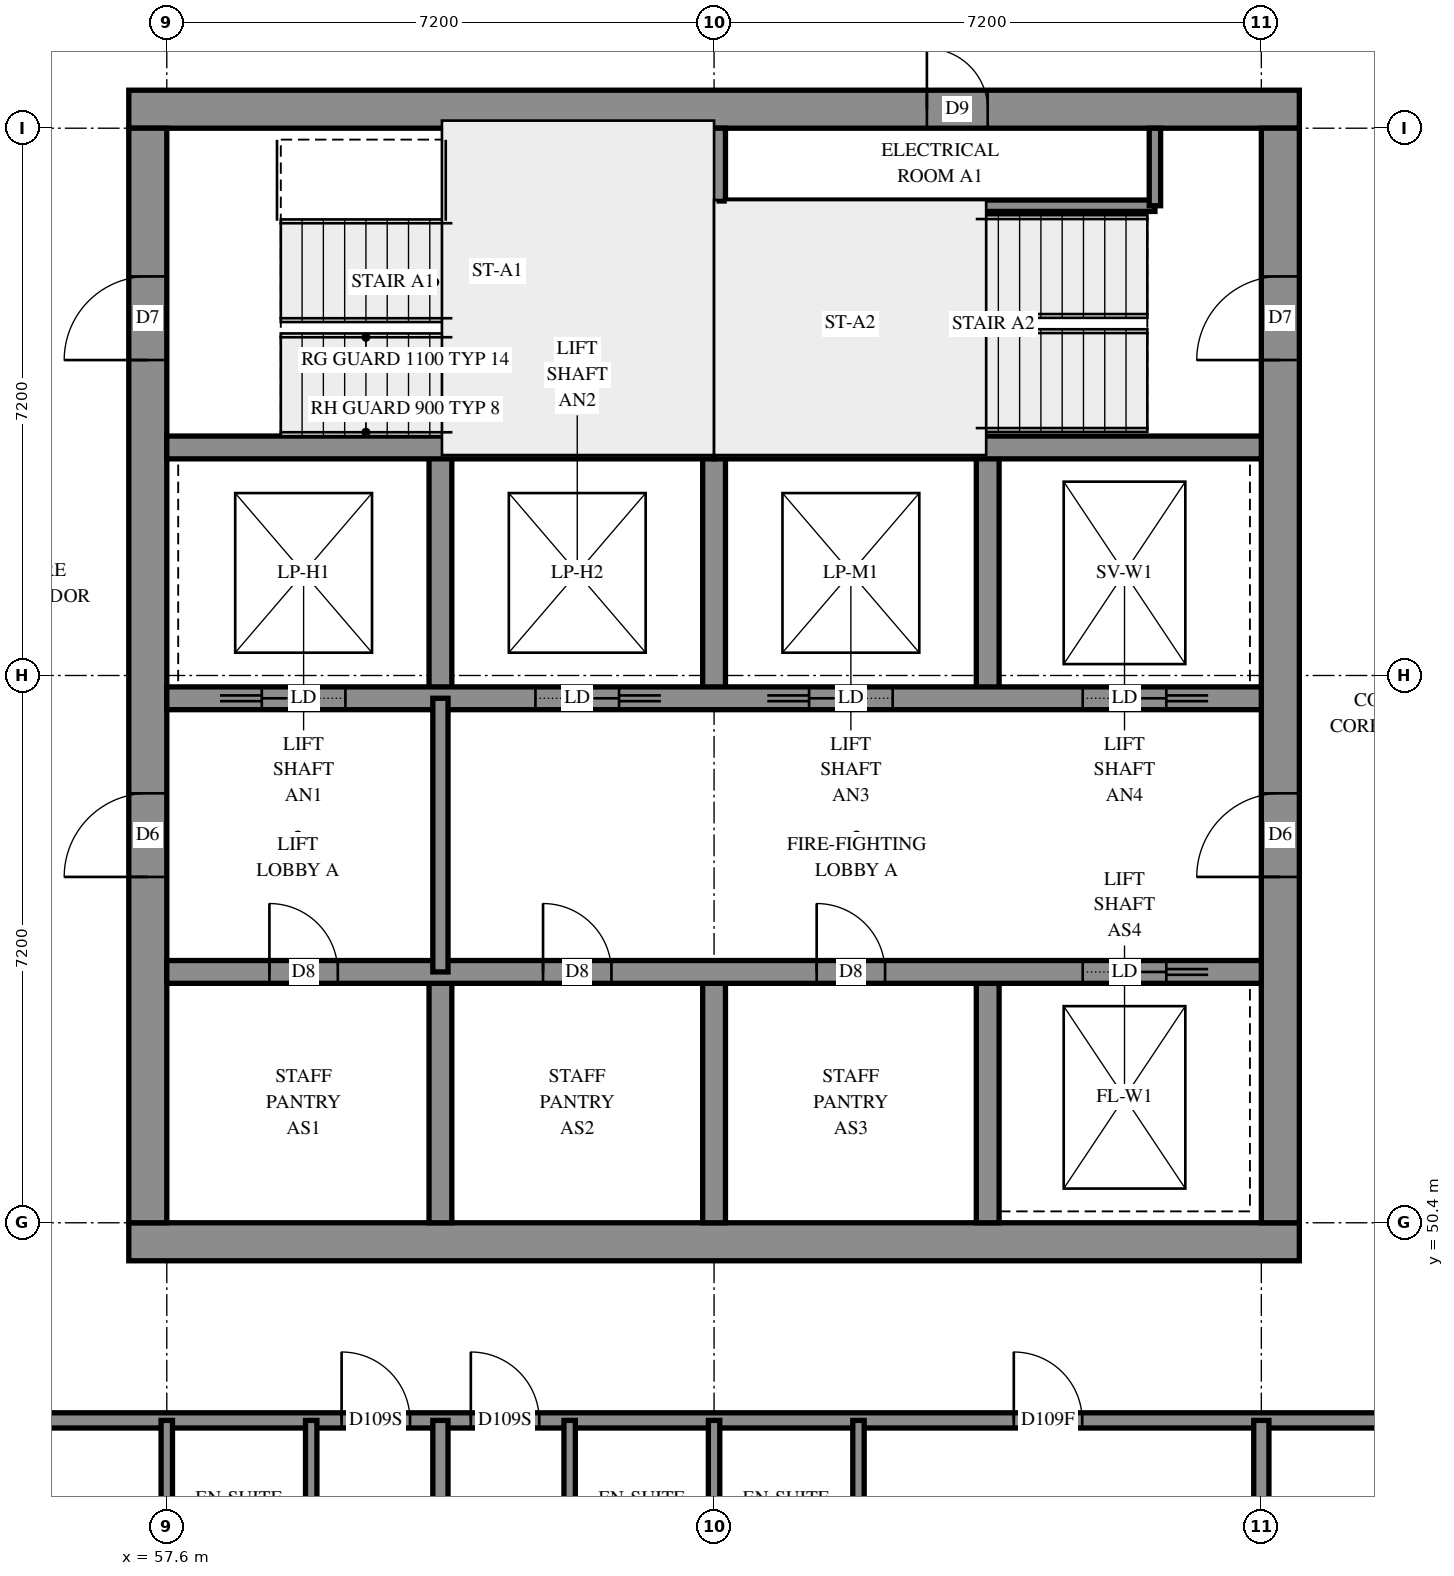
"""IFC4 building model, lengths in metres.
Left out: names, types, materials, properties, quantities, classifications, styles, units other than length and angle.
Written with IfcOpenShell. Run it as: python <this file> out.ifc"""

import sys

from ifc_helpers import new_model, si_unit, direction, frame, frame_2d, origin, place, context, subcontext, project, spatial, rectangle, extrude, element, fill, save


model = new_model("IFC4")
c1 = context("Model", 3, precision=1e-05, world=origin(), true_north=direction((0.0, 1.0)))
c2 = subcontext(c1, "Body", "Model", "MODEL_VIEW")
j1 = project(units=[si_unit("LENGTHUNIT", "METRE"), si_unit("PLANEANGLEUNIT", "RADIAN")], contexts=[c1])
p1 = place(None, origin())
s1 = spatial("IfcSite", under=j1, at=p1, CompositionType="ELEMENT")
p2 = place(p1, origin())
s2 = spatial("IfcBuilding", under=s1, at=p2, CompositionType="ELEMENT")
p3 = place(p2, frame((0.0, 0.0, 203.2)))
s3 = spatial("IfcBuildingStorey", under=s2, at=p3, CompositionType="ELEMENT", Elevation=203.2)
p4 = place(p3, frame((57.1, 50.15, -0.3), z_axis=(0.0, 0.0, 1.0), x_axis=(1.0, 0.0, 0.0)))
e1 = element("IfcWall", 1, at=p4, inside=s3, PredefinedType="SHEAR", context=c2, shape_type="SweptSolid", body=[
    extrude(rectangle(XDim=15.4, YDim=0.5, at=frame_2d((7.7, 0.0))), origin(), (0.0, 0.0, 1.0), 2.7),
])
p5 = place(p3, frame((57.1, 65.05, -0.3), z_axis=(0.0, 0.0, 1.0), x_axis=(1.0, 0.0, 0.0)))
e2 = element("IfcWall", 2, at=p5, inside=s3, PredefinedType="SHEAR", context=c2, shape_type="SweptSolid", body=[
    extrude(rectangle(XDim=15.4, YDim=0.5, at=frame_2d((7.7, 0.0))), origin(), (0.0, 0.0, 1.0), 2.7),
])
p6 = place(p5, frame((10.5, 0.0, 0.3)))
e3 = element("IfcOpeningElement", 3, at=p6, cuts=e2, PredefinedType="OPENING", context=c2, shape_type="SweptSolid", body=[
    extrude(rectangle(XDim=0.8, YDim=2.1, at=frame_2d((0.4, 1.05))), frame((0.0, 0.26, 0.0), z_axis=(0.0, -1.0, 0.0), x_axis=(1.0, 0.0, 0.0)), (0.0, 0.0, 1.0), 0.52),
])
p7 = place(p3, frame((57.35, 50.4, -0.3), z_axis=(0.0, 0.0, 1.0), x_axis=(0.0, 1.0, 0.0)))
e4 = element("IfcWall", 4, at=p7, inside=s3, PredefinedType="SHEAR", context=c2, shape_type="SweptSolid", body=[
    extrude(rectangle(XDim=14.4, YDim=0.5, at=frame_2d((7.2, 0.0))), origin(), (0.0, 0.0, 1.0), 2.7),
])
p8 = place(p7, frame((4.55, 0.0, 0.3)))
e5 = element("IfcOpeningElement", 5, at=p8, cuts=e4, PredefinedType="OPENING", context=c2, shape_type="SweptSolid", body=[
    extrude(rectangle(XDim=1.1, YDim=2.1, at=frame_2d((0.55, 1.05))), frame((0.0, 0.26, 0.0), z_axis=(0.0, -1.0, 0.0), x_axis=(1.0, 0.0, 0.0)), (0.0, 0.0, 1.0), 0.52),
])
p9 = place(p7, frame((11.35, 0.0, 0.3)))
e6 = element("IfcOpeningElement", 6, at=p9, cuts=e4, PredefinedType="OPENING", context=c2, shape_type="SweptSolid", body=[
    extrude(rectangle(XDim=1.1, YDim=2.1, at=frame_2d((0.55, 1.05))), frame((0.0, 0.26, 0.0), z_axis=(0.0, -1.0, 0.0), x_axis=(1.0, 0.0, 0.0)), (0.0, 0.0, 1.0), 0.52),
])
p10 = place(p3, frame((72.25, 50.4, -0.3), z_axis=(0.0, 0.0, 1.0), x_axis=(0.0, 1.0, 0.0)))
e7 = element("IfcWall", 7, at=p10, inside=s3, PredefinedType="SHEAR", context=c2, shape_type="SweptSolid", body=[
    extrude(rectangle(XDim=14.4, YDim=0.5, at=frame_2d((7.2, 0.0))), origin(), (0.0, 0.0, 1.0), 2.7),
])
p11 = place(p10, frame((4.55, 0.0, 0.3)))
e8 = element("IfcOpeningElement", 8, at=p11, cuts=e7, PredefinedType="OPENING", context=c2, shape_type="SweptSolid", body=[
    extrude(rectangle(XDim=1.1, YDim=2.1, at=frame_2d((0.55, 1.05))), frame((0.0, 0.26, 0.0), z_axis=(0.0, -1.0, 0.0), x_axis=(1.0, 0.0, 0.0)), (0.0, 0.0, 1.0), 0.52),
])
p12 = place(p10, frame((11.35, 0.0, 0.3)))
e9 = element("IfcOpeningElement", 9, at=p12, cuts=e7, PredefinedType="OPENING", context=c2, shape_type="SweptSolid", body=[
    extrude(rectangle(XDim=1.1, YDim=2.1, at=frame_2d((0.55, 1.05))), frame((0.0, 0.26, 0.0), z_axis=(0.0, -1.0, 0.0), x_axis=(1.0, 0.0, 0.0)), (0.0, 0.0, 1.0), 0.52),
])
for number, where, z_axis, x_axis in (
    (10, (61.2, 50.4, 0.0), (0.0, 0.0, 1.0), (0.0, 1.0, 0.0)),
    (11, (61.2, 57.3, 0.0), (0.0, 0.0, 1.0), (0.0, 1.0, 0.0)),
    (12, (64.8, 50.4, 0.0), (0.0, 0.0, 1.0), (0.0, 1.0, 0.0)),
    (13, (64.8, 57.3, 0.0), (0.0, 0.0, 1.0), (0.0, 1.0, 0.0)),
    (14, (68.4, 50.4, 0.0), (0.0, 0.0, 1.0), (0.0, 1.0, 0.0)),
    (15, (68.4, 57.3, 0.0), (0.0, 0.0, 1.0), (0.0, 1.0, 0.0)),
):
    element("IfcWall", number, at=place(p3, frame(where, z_axis=z_axis, x_axis=x_axis)), inside=s3, PredefinedType="SOLIDWALL", context=c2, shape_type="SweptSolid", body=[
        extrude(rectangle(XDim=3.3, YDim=0.3, at=frame_2d((1.65, 0.0))), origin(), (0.0, 0.0, 1.0), 3.1),
    ])
p13 = place(p3, frame((57.6, 53.7, 0.0), z_axis=(0.0, 0.0, 1.0), x_axis=(1.0, 0.0, 0.0)))
e16 = element("IfcWall", 16, at=p13, inside=s3, PredefinedType="SOLIDWALL", context=c2, shape_type="SweptSolid", body=[
    extrude(rectangle(XDim=14.4, YDim=0.3, at=frame_2d((7.2, 0.0))), origin(), (0.0, 0.0, 1.0), 3.1),
])
p14 = place(p13, frame((1.35, 0.0, 0.0)))
e17 = element("IfcOpeningElement", 17, at=p14, cuts=e16, PredefinedType="OPENING", context=c2, shape_type="SweptSolid", body=[
    extrude(rectangle(XDim=0.9, YDim=2.1, at=frame_2d((0.45, 1.05))), frame((0.0, 0.16, 0.0), z_axis=(0.0, -1.0, 0.0), x_axis=(1.0, 0.0, 0.0)), (0.0, 0.0, 1.0), 0.32),
])
p15 = place(p13, frame((4.95, 0.0, 0.0)))
e18 = element("IfcOpeningElement", 18, at=p15, cuts=e16, PredefinedType="OPENING", context=c2, shape_type="SweptSolid", body=[
    extrude(rectangle(XDim=0.9, YDim=2.1, at=frame_2d((0.45, 1.05))), frame((0.0, 0.16, 0.0), z_axis=(0.0, -1.0, 0.0), x_axis=(1.0, 0.0, 0.0)), (0.0, 0.0, 1.0), 0.32),
])
p16 = place(p13, frame((8.55, 0.0, 0.0)))
e19 = element("IfcOpeningElement", 19, at=p16, cuts=e16, PredefinedType="OPENING", context=c2, shape_type="SweptSolid", body=[
    extrude(rectangle(XDim=0.9, YDim=2.1, at=frame_2d((0.45, 1.05))), frame((0.0, 0.16, 0.0), z_axis=(0.0, -1.0, 0.0), x_axis=(1.0, 0.0, 0.0)), (0.0, 0.0, 1.0), 0.32),
])
p17 = place(p13, frame((12.05, 0.0, 0.0)))
e20 = element("IfcOpeningElement", 20, at=p17, cuts=e16, PredefinedType="OPENING", context=c2, shape_type="SweptSolid", body=[
    extrude(rectangle(XDim=1.1, YDim=2.1, at=frame_2d((0.55, 1.05))), frame((0.0, 0.16, 0.0), z_axis=(0.0, -1.0, 0.0), x_axis=(1.0, 0.0, 0.0)), (0.0, 0.0, 1.0), 0.32),
])
p18 = place(p3, frame((57.6, 57.3, 0.0), z_axis=(0.0, 0.0, 1.0), x_axis=(1.0, 0.0, 0.0)))
e21 = element("IfcWall", 21, at=p18, inside=s3, PredefinedType="SOLIDWALL", context=c2, shape_type="SweptSolid", body=[
    extrude(rectangle(XDim=14.4, YDim=0.3, at=frame_2d((7.2, 0.0))), origin(), (0.0, 0.0, 1.0), 3.1),
])
p19 = place(p18, frame((1.25, 0.0, 0.0)))
e22 = element("IfcOpeningElement", 22, at=p19, cuts=e21, PredefinedType="OPENING", context=c2, shape_type="SweptSolid", body=[
    extrude(rectangle(XDim=1.1, YDim=2.1, at=frame_2d((0.55, 1.05))), frame((0.0, 0.16, 0.0), z_axis=(0.0, -1.0, 0.0), x_axis=(1.0, 0.0, 0.0)), (0.0, 0.0, 1.0), 0.32),
])
p20 = place(p18, frame((4.85, 0.0, 0.0)))
e23 = element("IfcOpeningElement", 23, at=p20, cuts=e21, PredefinedType="OPENING", context=c2, shape_type="SweptSolid", body=[
    extrude(rectangle(XDim=1.1, YDim=2.1, at=frame_2d((0.55, 1.05))), frame((0.0, 0.16, 0.0), z_axis=(0.0, -1.0, 0.0), x_axis=(1.0, 0.0, 0.0)), (0.0, 0.0, 1.0), 0.32),
])
p21 = place(p18, frame((8.45, 0.0, 0.0)))
e24 = element("IfcOpeningElement", 24, at=p21, cuts=e21, PredefinedType="OPENING", context=c2, shape_type="SweptSolid", body=[
    extrude(rectangle(XDim=1.1, YDim=2.1, at=frame_2d((0.55, 1.05))), frame((0.0, 0.16, 0.0), z_axis=(0.0, -1.0, 0.0), x_axis=(1.0, 0.0, 0.0)), (0.0, 0.0, 1.0), 0.32),
])
p22 = place(p18, frame((12.05, 0.0, 0.0)))
e25 = element("IfcOpeningElement", 25, at=p22, cuts=e21, PredefinedType="OPENING", context=c2, shape_type="SweptSolid", body=[
    extrude(rectangle(XDim=1.1, YDim=2.1, at=frame_2d((0.55, 1.05))), frame((0.0, 0.16, 0.0), z_axis=(0.0, -1.0, 0.0), x_axis=(1.0, 0.0, 0.0)), (0.0, 0.0, 1.0), 0.32),
])
for number, where, z_axis, x_axis in (
    (26, (57.6, 60.6, 0.0), (0.0, 0.0, 1.0), (1.0, 0.0, 0.0)),
    (27, (64.8, 60.6, 0.0), (0.0, 0.0, 1.0), (1.0, 0.0, 0.0)),
):
    element("IfcWall", number, at=place(p3, frame(where, z_axis=z_axis, x_axis=x_axis)), inside=s3, PredefinedType="SOLIDWALL", context=c2, shape_type="SweptSolid", body=[
        extrude(rectangle(XDim=7.2, YDim=0.3, at=frame_2d((3.6, 0.0))), origin(), (0.0, 0.0, 1.0), 3.1),
    ])
p23 = place(p3, frame((64.8, 60.6, 0.0), z_axis=(0.0, 0.0, 1.0), x_axis=(0.0, 1.0, 0.0)))
e28 = element("IfcWall", 28, at=p23, inside=s3, PredefinedType="SOLIDWALL", context=c2, shape_type="SweptSolid", body=[
    extrude(rectangle(XDim=4.2, YDim=0.3, at=frame_2d((2.1, 0.0))), origin(), (0.0, 0.0, 1.0), 3.1),
])
p24 = place(p3, frame((64.95, 63.78, 0.0), z_axis=(0.0, 0.0, 1.0), x_axis=(1.0, 0.0, 0.0)))
e29 = element("IfcWall", 29, at=p24, inside=s3, PredefinedType="PARTITIONING", context=c2, shape_type="SweptSolid", body=[
    extrude(rectangle(XDim=5.65, YDim=0.15, at=frame_2d((2.825, 0.0))), origin(), (0.0, 0.0, 1.0), 3.1),
])
p25 = place(p3, frame((70.6, 63.78, 0.0), z_axis=(0.0, 0.0, 1.0), x_axis=(0.0, 1.0, 0.0)))
e30 = element("IfcWall", 30, at=p25, inside=s3, PredefinedType="PARTITIONING", context=c2, shape_type="SweptSolid", body=[
    extrude(rectangle(XDim=1.02, YDim=0.15, at=frame_2d((0.51, 0.0))), origin(), (0.0, 0.0, 1.0), 3.1),
])
p26 = place(p3, frame((61.2, 53.7, 0.0), z_axis=(0.0, 0.0, 1.0), x_axis=(0.0, 1.0, 0.0)))
e31 = element("IfcWall", 31, at=p26, inside=s3, PredefinedType="PARTITIONING", context=c2, shape_type="SweptSolid", body=[
    extrude(rectangle(XDim=3.6, YDim=0.2, at=frame_2d((1.8, 0.0))), origin(), (0.0, 0.0, 1.0), 3.1),
])
p27 = place(p3, frame((55.0, 47.8, 0.0), z_axis=(0.0, 0.0, 1.0), x_axis=(1.0, 0.0, 0.0)))
e32 = element("IfcWall", 32, at=p27, inside=s3, PredefinedType="PARTITIONING", context=c2, shape_type="SweptSolid", body=[
    extrude(rectangle(XDim=19.266, YDim=0.2, at=frame_2d((9.633, 0.0))), origin(), (0.0, 0.0, 1.0), 3.1),
])
p28 = place(p27, frame((4.9, 0.0, 0.0)))
e33 = element("IfcOpeningElement", 33, at=p28, cuts=e32, PredefinedType="OPENING", context=c2, shape_type="SweptSolid", body=[
    extrude(rectangle(XDim=0.9, YDim=2.1, at=frame_2d((0.45, 1.05))), frame((0.0, 0.11, 0.0), z_axis=(0.0, -1.0, 0.0), x_axis=(1.0, 0.0, 0.0)), (0.0, 0.0, 1.0), 0.22),
])
p29 = place(p27, frame((6.6, 0.0, 0.0)))
e34 = element("IfcOpeningElement", 34, at=p29, cuts=e32, PredefinedType="OPENING", context=c2, shape_type="SweptSolid", body=[
    extrude(rectangle(XDim=0.9, YDim=2.1, at=frame_2d((0.45, 1.05))), frame((0.0, 0.11, 0.0), z_axis=(0.0, -1.0, 0.0), x_axis=(1.0, 0.0, 0.0)), (0.0, 0.0, 1.0), 0.22),
])
p30 = place(p27, frame((13.743, 0.0, 0.0)))
e35 = element("IfcOpeningElement", 35, at=p30, cuts=e32, PredefinedType="OPENING", context=c2, shape_type="SweptSolid", body=[
    extrude(rectangle(XDim=0.9, YDim=2.1, at=frame_2d((0.45, 1.05))), frame((0.0, 0.11, 0.0), z_axis=(0.0, -1.0, 0.0), x_axis=(1.0, 0.0, 0.0)), (0.0, 0.0, 1.0), 0.22),
])
p31 = place(p3, frame((61.2, 42.362, 0.0), z_axis=(0.0, 0.0, 1.0), x_axis=(0.0, 1.0, 0.0)))
e36 = element("IfcWall", 36, at=p31, inside=s3, PredefinedType="PARTITIONING", context=c2, shape_type="SweptSolid", body=[
    extrude(rectangle(XDim=5.438, YDim=0.2, at=frame_2d((2.719, 0.0))), origin(), (0.0, 0.0, 1.0), 3.1),
])
p32 = place(p3, frame((72.0, 43.6, 0.0), z_axis=(0.0, 0.0, 1.0), x_axis=(0.0, 1.0, 0.0)))
e37 = element("IfcWall", 37, at=p32, inside=s3, PredefinedType="PARTITIONING", context=c2, shape_type="SweptSolid", body=[
    extrude(rectangle(XDim=4.2, YDim=0.2, at=frame_2d((2.1, 0.0))), origin(), (0.0, 0.0, 1.0), 3.1),
])
for number, where, z_axis, x_axis in (
    (38, (59.5, 45.4, 0.0), (0.0, 0.0, 1.0), (0.0, 1.0, 0.0)),
    (39, (57.6, 45.4, 0.0), (0.0, 0.0, 1.0), (0.0, 1.0, 0.0)),
    (40, (62.9, 45.4, 0.0), (0.0, 0.0, 1.0), (0.0, 1.0, 0.0)),
    (41, (66.7, 45.4, 0.0), (0.0, 0.0, 1.0), (0.0, 1.0, 0.0)),
    (42, (64.8, 45.4, 0.0), (0.0, 0.0, 1.0), (0.0, 1.0, 0.0)),
):
    element("IfcWall", number, at=place(p3, frame(where, z_axis=z_axis, x_axis=x_axis)), inside=s3, PredefinedType="PARTITIONING", context=c2, shape_type="SweptSolid", body=[
        extrude(rectangle(XDim=2.4, YDim=0.15, at=frame_2d((1.2, 0.0))), origin(), (0.0, 0.0, 1.0), 3.1),
    ])
p33 = place(p6, origin())
e43 = element("IfcDoor", 43, at=p33, inside=s3, OperationType="SINGLE_SWING_RIGHT", PredefinedType="DOOR", context=c2, shape_type="SweptSolid", body=[
    extrude(rectangle(XDim=0.8, YDim=2.1, at=frame_2d((0.4, 1.05))), frame((0.0, 0.025, 0.0), z_axis=(0.0, -1.0, 0.0), x_axis=(1.0, 0.0, 0.0)), (0.0, 0.0, 1.0), 0.05),
])
fill(e3, e43)
p34 = place(p8, origin())
e44 = element("IfcDoor", 44, at=p34, inside=s3, OperationType="DOUBLE_DOOR_SINGLE_SWING", PredefinedType="DOOR", context=c2, shape_type="SweptSolid", body=[
    extrude(rectangle(XDim=1.1, YDim=2.1, at=frame_2d((0.55, 1.05))), frame((0.0, 0.025, 0.0), z_axis=(0.0, -1.0, 0.0), x_axis=(1.0, 0.0, 0.0)), (0.0, 0.0, 1.0), 0.05),
])
fill(e5, e44)
p35 = place(p11, origin())
e45 = element("IfcDoor", 45, at=p35, inside=s3, OperationType="DOUBLE_DOOR_SINGLE_SWING", PredefinedType="DOOR", context=c2, shape_type="SweptSolid", body=[
    extrude(rectangle(XDim=1.1, YDim=2.1, at=frame_2d((0.55, 1.05))), frame((0.0, 0.025, 0.0), z_axis=(0.0, -1.0, 0.0), x_axis=(1.0, 0.0, 0.0)), (0.0, 0.0, 1.0), 0.05),
])
fill(e8, e45)
p36 = place(p9, origin())
e46 = element("IfcDoor", 46, at=p36, inside=s3, OperationType="SINGLE_SWING_LEFT", PredefinedType="DOOR", context=c2, shape_type="SweptSolid", body=[
    extrude(rectangle(XDim=1.1, YDim=2.1, at=frame_2d((0.55, 1.05))), frame((0.0, 0.025, 0.0), z_axis=(0.0, -1.0, 0.0), x_axis=(1.0, 0.0, 0.0)), (0.0, 0.0, 1.0), 0.05),
])
fill(e6, e46)
p37 = place(p12, origin())
e47 = element("IfcDoor", 47, at=p37, inside=s3, OperationType="SINGLE_SWING_RIGHT", PredefinedType="DOOR", context=c2, shape_type="SweptSolid", body=[
    extrude(rectangle(XDim=1.1, YDim=2.1, at=frame_2d((0.55, 1.05))), frame((0.0, 0.025, 0.0), z_axis=(0.0, -1.0, 0.0), x_axis=(1.0, 0.0, 0.0)), (0.0, 0.0, 1.0), 0.05),
])
fill(e9, e47)
p38 = place(p14, origin())
e48 = element("IfcDoor", 48, at=p38, inside=s3, OperationType="SINGLE_SWING_LEFT", PredefinedType="DOOR", context=c2, shape_type="SweptSolid", body=[
    extrude(rectangle(XDim=0.9, YDim=2.1, at=frame_2d((0.45, 1.05))), frame((0.0, 0.025, 0.0), z_axis=(0.0, -1.0, 0.0), x_axis=(1.0, 0.0, 0.0)), (0.0, 0.0, 1.0), 0.05),
])
fill(e17, e48)
p39 = place(p15, origin())
e49 = element("IfcDoor", 49, at=p39, inside=s3, OperationType="SINGLE_SWING_LEFT", PredefinedType="DOOR", context=c2, shape_type="SweptSolid", body=[
    extrude(rectangle(XDim=0.9, YDim=2.1, at=frame_2d((0.45, 1.05))), frame((0.0, 0.025, 0.0), z_axis=(0.0, -1.0, 0.0), x_axis=(1.0, 0.0, 0.0)), (0.0, 0.0, 1.0), 0.05),
])
fill(e18, e49)
p40 = place(p16, origin())
e50 = element("IfcDoor", 50, at=p40, inside=s3, OperationType="SINGLE_SWING_LEFT", PredefinedType="DOOR", context=c2, shape_type="SweptSolid", body=[
    extrude(rectangle(XDim=0.9, YDim=2.1, at=frame_2d((0.45, 1.05))), frame((0.0, 0.025, 0.0), z_axis=(0.0, -1.0, 0.0), x_axis=(1.0, 0.0, 0.0)), (0.0, 0.0, 1.0), 0.05),
])
fill(e19, e50)
p41 = place(p17, origin())
e51 = element("IfcDoor", 51, at=p41, inside=s3, OperationType="SLIDING_TO_RIGHT", PredefinedType="DOOR", context=c2, shape_type="SweptSolid", body=[
    extrude(rectangle(XDim=1.1, YDim=2.1, at=frame_2d((0.55, 1.05))), frame((0.0, 0.025, 0.0), z_axis=(0.0, -1.0, 0.0), x_axis=(1.0, 0.0, 0.0)), (0.0, 0.0, 1.0), 0.05),
])
fill(e20, e51)
p42 = place(p19, origin())
e52 = element("IfcDoor", 52, at=p42, inside=s3, OperationType="SLIDING_TO_LEFT", PredefinedType="DOOR", context=c2, shape_type="SweptSolid", body=[
    extrude(rectangle(XDim=1.1, YDim=2.1, at=frame_2d((0.55, 1.05))), frame((0.0, 0.025, 0.0), z_axis=(0.0, -1.0, 0.0), x_axis=(1.0, 0.0, 0.0)), (0.0, 0.0, 1.0), 0.05),
])
fill(e22, e52)
p43 = place(p20, origin())
e53 = element("IfcDoor", 53, at=p43, inside=s3, OperationType="SLIDING_TO_RIGHT", PredefinedType="DOOR", context=c2, shape_type="SweptSolid", body=[
    extrude(rectangle(XDim=1.1, YDim=2.1, at=frame_2d((0.55, 1.05))), frame((0.0, 0.025, 0.0), z_axis=(0.0, -1.0, 0.0), x_axis=(1.0, 0.0, 0.0)), (0.0, 0.0, 1.0), 0.05),
])
fill(e23, e53)
p44 = place(p21, origin())
e54 = element("IfcDoor", 54, at=p44, inside=s3, OperationType="SLIDING_TO_LEFT", PredefinedType="DOOR", context=c2, shape_type="SweptSolid", body=[
    extrude(rectangle(XDim=1.1, YDim=2.1, at=frame_2d((0.55, 1.05))), frame((0.0, 0.025, 0.0), z_axis=(0.0, -1.0, 0.0), x_axis=(1.0, 0.0, 0.0)), (0.0, 0.0, 1.0), 0.05),
])
fill(e24, e54)
p45 = place(p22, origin())
e55 = element("IfcDoor", 55, at=p45, inside=s3, OperationType="SLIDING_TO_RIGHT", PredefinedType="DOOR", context=c2, shape_type="SweptSolid", body=[
    extrude(rectangle(XDim=1.1, YDim=2.1, at=frame_2d((0.55, 1.05))), frame((0.0, 0.025, 0.0), z_axis=(0.0, -1.0, 0.0), x_axis=(1.0, 0.0, 0.0)), (0.0, 0.0, 1.0), 0.05),
])
fill(e25, e55)
p46 = place(p28, origin())
e56 = element("IfcDoor", 56, at=p46, inside=s3, OperationType="SINGLE_SWING_LEFT", PredefinedType="DOOR", context=c2, shape_type="SweptSolid", body=[
    extrude(rectangle(XDim=0.9, YDim=2.1, at=frame_2d((0.45, 1.05))), frame((0.0, 0.025, 0.0), z_axis=(0.0, -1.0, 0.0), x_axis=(1.0, 0.0, 0.0)), (0.0, 0.0, 1.0), 0.05),
])
fill(e33, e56)
p47 = place(p29, origin())
e57 = element("IfcDoor", 57, at=p47, inside=s3, OperationType="SINGLE_SWING_RIGHT", PredefinedType="DOOR", context=c2, shape_type="SweptSolid", body=[
    extrude(rectangle(XDim=0.9, YDim=2.1, at=frame_2d((0.45, 1.05))), frame((0.0, 0.025, 0.0), z_axis=(0.0, -1.0, 0.0), x_axis=(1.0, 0.0, 0.0)), (0.0, 0.0, 1.0), 0.05),
])
fill(e34, e57)
p48 = place(p30, origin())
e58 = element("IfcDoor", 58, at=p48, inside=s3, OperationType="SINGLE_SWING_LEFT", PredefinedType="DOOR", context=c2, shape_type="SweptSolid", body=[
    extrude(rectangle(XDim=0.9, YDim=2.1, at=frame_2d((0.45, 1.05))), frame((0.0, 0.025, 0.0), z_axis=(0.0, -1.0, 0.0), x_axis=(1.0, 0.0, 0.0)), (0.0, 0.0, 1.0), 0.05),
])
fill(e35, e58)
save(model, sys.argv[1])
